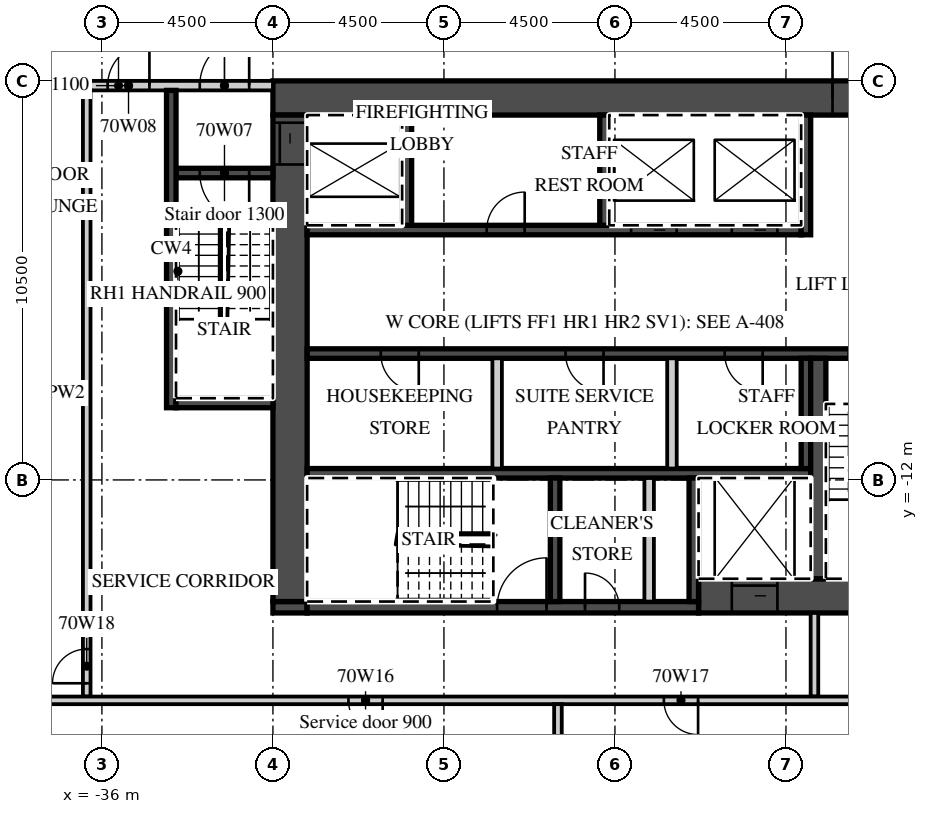
"""IFC4 building model, lengths in metres.
Left out: names, types, materials, properties, quantities, classifications, styles, units other than length and angle.
Written with IfcOpenShell. Run it as: python <this file> out.ifc"""

import sys

from ifc_helpers import new_model, si_unit, direction, frame, frame_2d, origin, place, context, subcontext, project, spatial, rectangle, extrude, element, fill, save


model = new_model("IFC4")
c1 = context("Model", 3, precision=1e-05, world=origin(), true_north=direction((0.0, 1.0)))
c2 = subcontext(c1, "Body", "Model", "MODEL_VIEW")
j1 = project(units=[si_unit("LENGTHUNIT", "METRE"), si_unit("PLANEANGLEUNIT", "RADIAN")], contexts=[c1])
p1 = place(None, origin())
s1 = spatial("IfcSite", under=j1, at=p1, CompositionType="ELEMENT")
p2 = place(p1, origin())
s2 = spatial("IfcBuilding", under=s1, at=p2, CompositionType="ELEMENT")
p3 = place(p2, frame((0.0, 0.0, 281.7)))
s3 = spatial("IfcBuildingStorey", under=s2, at=p3, CompositionType="ELEMENT", Elevation=281.7)
p4 = place(p3, frame((-31.5, -1.95, 0.0), z_axis=(0.0, 0.0, 1.0), x_axis=(1.0, 0.0, 0.0)))
e1 = element("IfcWall", 1, at=p4, inside=s3, PredefinedType="SHEAR", context=c2, shape_type="SweptSolid", body=[
    extrude(rectangle(XDim=18.0, YDim=0.9, at=frame_2d((9.0, 0.0))), origin(), (0.0, 0.0, 1.0), 3.02),
])
p5 = place(p4, frame((14.725, 0.0, 0.0)))
e2 = element("IfcOpeningElement", 2, at=p5, cuts=e1, PredefinedType="OPENING", context=c2, shape_type="SweptSolid", body=[
    extrude(rectangle(XDim=1.8, YDim=2.1, at=frame_2d((0.9, 1.05))), frame((0.0, 0.46, 0.0), z_axis=(0.0, -1.0, 0.0), x_axis=(1.0, 0.0, 0.0)), (0.0, 0.0, 1.0), 0.92),
])
p6 = place(p3, frame((-20.3, -15.05, 0.0), z_axis=(0.0, 0.0, 1.0), x_axis=(1.0, 0.0, 0.0)))
e3 = element("IfcWall", 3, at=p6, inside=s3, PredefinedType="SHEAR", context=c2, shape_type="SweptSolid", body=[
    extrude(rectangle(XDim=6.8, YDim=0.9, at=frame_2d((3.4, 0.0))), origin(), (0.0, 0.0, 1.0), 3.02),
])
p7 = place(p6, frame((0.875, 0.0, 0.0)))
e4 = element("IfcOpeningElement", 4, at=p7, cuts=e3, PredefinedType="OPENING", context=c2, shape_type="SweptSolid", body=[
    extrude(rectangle(XDim=1.2, YDim=2.1, at=frame_2d((0.6, 1.05))), frame((0.0, 0.46, 0.0), z_axis=(0.0, -1.0, 0.0), x_axis=(1.0, 0.0, 0.0)), (0.0, 0.0, 1.0), 0.92),
])
p8 = place(p3, frame((-31.5, -15.35, 0.0), z_axis=(0.0, 0.0, 1.0), x_axis=(1.0, 0.0, 0.0)))
e5 = element("IfcWall", 5, at=p8, inside=s3, PredefinedType="SHEAR", context=c2, shape_type="SweptSolid", body=[
    extrude(rectangle(XDim=0.9, YDim=0.3, at=frame_2d((0.45, 0.0))), origin(), (0.0, 0.0, 1.0), 3.02),
])
p9 = place(p3, frame((-30.6, -15.35, 0.0), z_axis=(0.0, 0.0, 1.0), x_axis=(1.0, 0.0, 0.0)))
e6 = element("IfcWall", 6, at=p9, inside=s3, PredefinedType="SHEAR", context=c2, shape_type="SweptSolid", body=[
    extrude(rectangle(XDim=10.3, YDim=0.3, at=frame_2d((5.15, 0.0))), origin(), (0.0, 0.0, 1.0), 3.02),
])
p10 = place(p9, frame((5.0, 0.0, 0.0)))
e7 = element("IfcOpeningElement", 7, at=p10, cuts=e6, PredefinedType="OPENING", context=c2, shape_type="SweptSolid", body=[
    extrude(rectangle(XDim=1.3, YDim=2.1, at=frame_2d((0.65, 1.05))), frame((0.0, 0.16, 0.0), z_axis=(0.0, -1.0, 0.0), x_axis=(1.0, 0.0, 0.0)), (0.0, 0.0, 1.0), 0.32),
])
p11 = place(p9, frame((7.312, 0.0, 0.0)))
e8 = element("IfcOpeningElement", 8, at=p11, cuts=e6, PredefinedType="OPENING", context=c2, shape_type="SweptSolid", body=[
    extrude(rectangle(XDim=0.9, YDim=2.1, at=frame_2d((0.45, 1.05))), frame((0.0, 0.16, 0.0), z_axis=(0.0, -1.0, 0.0), x_axis=(1.0, 0.0, 0.0)), (0.0, 0.0, 1.0), 0.32),
])
p12 = place(p3, frame((-31.05, -15.2, 0.0), z_axis=(0.0, 0.0, 1.0), x_axis=(0.0, 1.0, 0.0)))
e9 = element("IfcWall", 9, at=p12, inside=s3, PredefinedType="SHEAR", context=c2, shape_type="SweptSolid", body=[
    extrude(rectangle(XDim=12.8, YDim=0.9, at=frame_2d((6.4, 0.0))), origin(), (0.0, 0.0, 1.0), 3.02),
])
p13 = place(p12, frame((11.5, 0.0, 0.0)))
e10 = element("IfcOpeningElement", 10, at=p13, cuts=e9, PredefinedType="OPENING", context=c2, shape_type="SweptSolid", body=[
    extrude(rectangle(XDim=1.1, YDim=2.1, at=frame_2d((0.55, 1.05))), frame((0.0, 0.46, 0.0), z_axis=(0.0, -1.0, 0.0), x_axis=(1.0, 0.0, 0.0)), (0.0, 0.0, 1.0), 0.92),
])
p14 = place(p3, frame((-30.6, -5.425, 0.0), z_axis=(0.0, 0.0, 1.0), x_axis=(1.0, 0.0, 0.0)))
e11 = element("IfcWall", 11, at=p14, inside=s3, PredefinedType="SHEAR", context=c2, shape_type="SweptSolid", body=[
    extrude(rectangle(XDim=13.0, YDim=0.25, at=frame_2d((6.5, 0.0))), origin(), (0.0, 0.0, 1.0), 3.02),
])
p15 = place(p14, frame((8.525, 0.0, 0.0)))
e12 = element("IfcOpeningElement", 12, at=p15, cuts=e11, PredefinedType="OPENING", context=c2, shape_type="SweptSolid", body=[
    extrude(rectangle(XDim=1.2, YDim=2.1, at=frame_2d((0.6, 1.05))), frame((0.0, 0.135, 0.0), z_axis=(0.0, -1.0, 0.0), x_axis=(1.0, 0.0, 0.0)), (0.0, 0.0, 1.0), 0.27),
])
p16 = place(p14, frame((11.175, 0.0, 0.0)))
e13 = element("IfcOpeningElement", 13, at=p16, cuts=e11, PredefinedType="OPENING", context=c2, shape_type="SweptSolid", body=[
    extrude(rectangle(XDim=1.2, YDim=2.1, at=frame_2d((0.6, 1.05))), frame((0.0, 0.135, 0.0), z_axis=(0.0, -1.0, 0.0), x_axis=(1.0, 0.0, 0.0)), (0.0, 0.0, 1.0), 0.27),
])
p17 = place(p14, frame((4.725, 0.0, 0.0)))
e14 = element("IfcOpeningElement", 14, at=p17, cuts=e11, PredefinedType="OPENING", context=c2, shape_type="SweptSolid", body=[
    extrude(rectangle(XDim=1.0, YDim=2.1, at=frame_2d((0.5, 1.05))), frame((0.0, 0.135, 0.0), z_axis=(0.0, -1.0, 0.0), x_axis=(1.0, 0.0, 0.0)), (0.0, 0.0, 1.0), 0.27),
])
p18 = place(p3, frame((-17.475, -5.55, 0.0), z_axis=(0.0, 0.0, 1.0), x_axis=(0.0, 1.0, 0.0)))
e15 = element("IfcWall", 15, at=p18, inside=s3, PredefinedType="SHEAR", context=c2, shape_type="SweptSolid", body=[
    extrude(rectangle(XDim=3.15, YDim=0.25, at=frame_2d((1.575, 0.0))), origin(), (0.0, 0.0, 1.0), 3.02),
])
for number, where, z_axis, x_axis in (
    (16, (-27.975, -5.3, 0.0), (0.0, 0.0, 1.0), (0.0, 1.0, 0.0)),
    (17, (-22.775, -5.3, 0.0), (0.0, 0.0, 1.0), (0.0, 1.0, 0.0)),
):
    element("IfcWall", number, at=place(p3, frame(where, z_axis=z_axis, x_axis=x_axis)), inside=s3, PredefinedType="SHEAR", context=c2, shape_type="SweptSolid", body=[
        extrude(rectangle(XDim=2.9, YDim=0.25, at=frame_2d((1.45, 0.0))), origin(), (0.0, 0.0, 1.0), 3.02),
    ])
p19 = place(p3, frame((-30.6, -8.675, 0.0), z_axis=(0.0, 0.0, 1.0), x_axis=(1.0, 0.0, 0.0)))
e18 = element("IfcWall", 18, at=p19, inside=s3, PredefinedType="SHEAR", context=c2, shape_type="SweptSolid", body=[
    extrude(rectangle(XDim=16.2, YDim=0.25, at=frame_2d((8.1, 0.0))), origin(), (0.0, 0.0, 1.0), 3.02),
])
p20 = place(p19, frame((14.25, 0.0, 0.0)))
e19 = element("IfcOpeningElement", 19, at=p20, cuts=e18, PredefinedType="OPENING", context=c2, shape_type="SweptSolid", body=[
    extrude(rectangle(XDim=1.3, YDim=2.1, at=frame_2d((0.65, 1.05))), frame((0.0, 0.135, 0.0), z_axis=(0.0, -1.0, 0.0), x_axis=(1.0, 0.0, 0.0)), (0.0, 0.0, 1.0), 0.27),
])
p21 = place(p19, frame((1.938, 0.0, 0.0)))
e20 = element("IfcOpeningElement", 20, at=p21, cuts=e18, PredefinedType="OPENING", context=c2, shape_type="SweptSolid", body=[
    extrude(rectangle(XDim=1.0, YDim=2.1, at=frame_2d((0.5, 1.05))), frame((0.0, 0.135, 0.0), z_axis=(0.0, -1.0, 0.0), x_axis=(1.0, 0.0, 0.0)), (0.0, 0.0, 1.0), 0.27),
])
p22 = place(p19, frame((6.8, 0.0, 0.0)))
e21 = element("IfcOpeningElement", 21, at=p22, cuts=e18, PredefinedType="OPENING", context=c2, shape_type="SweptSolid", body=[
    extrude(rectangle(XDim=1.0, YDim=2.1, at=frame_2d((0.5, 1.05))), frame((0.0, 0.135, 0.0), z_axis=(0.0, -1.0, 0.0), x_axis=(1.0, 0.0, 0.0)), (0.0, 0.0, 1.0), 0.27),
])
p23 = place(p19, frame((10.988, 0.0, 0.0)))
e22 = element("IfcOpeningElement", 22, at=p23, cuts=e18, PredefinedType="OPENING", context=c2, shape_type="SweptSolid", body=[
    extrude(rectangle(XDim=1.0, YDim=2.1, at=frame_2d((0.5, 1.05))), frame((0.0, 0.135, 0.0), z_axis=(0.0, -1.0, 0.0), x_axis=(1.0, 0.0, 0.0)), (0.0, 0.0, 1.0), 0.27),
])
p24 = place(p3, frame((-30.6, -11.825, 0.0), z_axis=(0.0, 0.0, 1.0), x_axis=(1.0, 0.0, 0.0)))
e23 = element("IfcWall", 23, at=p24, inside=s3, PredefinedType="SHEAR", context=c2, shape_type="SweptSolid", body=[
    extrude(rectangle(XDim=13.25, YDim=0.25, at=frame_2d((6.625, 0.0))), origin(), (0.0, 0.0, 1.0), 3.02),
])
p25 = place(p3, frame((-17.475, -11.7, 0.0), z_axis=(0.0, 0.0, 1.0), x_axis=(0.0, 1.0, 0.0)))
e24 = element("IfcWall", 24, at=p25, inside=s3, PredefinedType="SHEAR", context=c2, shape_type="SweptSolid", body=[
    extrude(rectangle(XDim=2.9, YDim=0.25, at=frame_2d((1.45, 0.0))), origin(), (0.0, 0.0, 1.0), 3.02),
])
for number, where, z_axis, x_axis in (
    (25, (-25.6, -11.7, 0.0), (0.0, 0.0, 1.0), (0.0, 1.0, 0.0)),
    (26, (-21.0, -11.7, 0.0), (0.0, 0.0, 1.0), (0.0, 1.0, 0.0)),
):
    element("IfcWall", number, at=place(p3, frame(where, z_axis=z_axis, x_axis=x_axis)), inside=s3, PredefinedType="PARTITIONING", context=c2, shape_type="SweptSolid", body=[
        extrude(rectangle(XDim=2.9, YDim=0.25, at=frame_2d((1.45, 0.0))), origin(), (0.0, 0.0, 1.0), 3.02),
    ])
p26 = place(p3, frame((-17.15, -14.6, 0.0), z_axis=(0.0, 0.0, 1.0), x_axis=(0.0, 1.0, 0.0)))
e27 = element("IfcWall", 27, at=p26, inside=s3, PredefinedType="SHEAR", context=c2, shape_type="SweptSolid", body=[
    extrude(rectangle(XDim=5.8, YDim=0.4, at=frame_2d((2.9, 0.0))), origin(), (0.0, 0.0, 1.0), 3.02),
])
for number, where, z_axis, x_axis in (
    (28, (-20.425, -15.2, 0.0), (0.0, 0.0, 1.0), (0.0, 1.0, 0.0)),
    (29, (-24.075, -15.2, 0.0), (0.0, 0.0, 1.0), (0.0, 1.0, 0.0)),
):
    element("IfcWall", number, at=place(p3, frame(where, z_axis=z_axis, x_axis=x_axis)), inside=s3, PredefinedType="SHEAR", context=c2, shape_type="SweptSolid", body=[
        extrude(rectangle(XDim=3.25, YDim=0.25, at=frame_2d((1.625, 0.0))), origin(), (0.0, 0.0, 1.0), 3.02),
    ])
p27 = place(p3, frame((-21.6, -15.2, 0.0), z_axis=(0.0, 0.0, 1.0), x_axis=(0.0, 1.0, 0.0)))
e30 = element("IfcWall", 30, at=p27, inside=s3, PredefinedType="PARTITIONING", context=c2, shape_type="SweptSolid", body=[
    extrude(rectangle(XDim=3.25, YDim=0.25, at=frame_2d((1.625, 0.0))), origin(), (0.0, 0.0, 1.0), 3.02),
])
p28 = place(p3, frame((-39.627, -1.625, 0.0), z_axis=(0.0, 0.0, 1.0), x_axis=(1.0, 0.0, 0.0)))
e31 = element("IfcWall", 31, at=p28, inside=s3, PredefinedType="PARTITIONING", context=c2, shape_type="SweptSolid", body=[
    extrude(rectangle(XDim=8.127, YDim=0.25, at=frame_2d((4.063, 0.0))), origin(), (0.0, 0.0, 1.0), 3.02),
])
p29 = place(p28, frame((6.202, 0.0, 0.0)))
e32 = element("IfcOpeningElement", 32, at=p29, cuts=e31, PredefinedType="OPENING", context=c2, shape_type="SweptSolid", body=[
    extrude(rectangle(XDim=1.3, YDim=2.1, at=frame_2d((0.65, 1.05))), frame((0.0, 0.135, 0.0), z_axis=(0.0, -1.0, 0.0), x_axis=(1.0, 0.0, 0.0)), (0.0, 0.0, 1.0), 0.27),
])
p30 = place(p28, frame((3.777, 0.0, 0.0)))
e33 = element("IfcOpeningElement", 33, at=p30, cuts=e31, PredefinedType="OPENING", context=c2, shape_type="SweptSolid", body=[
    extrude(rectangle(XDim=1.1, YDim=2.1, at=frame_2d((0.55, 1.05))), frame((0.0, 0.135, 0.0), z_axis=(0.0, -1.0, 0.0), x_axis=(1.0, 0.0, 0.0)), (0.0, 0.0, 1.0), 0.27),
])
p31 = place(p3, frame((-34.05, -3.925, 0.0), z_axis=(0.0, 0.0, 1.0), x_axis=(1.0, 0.0, 0.0)))
e34 = element("IfcWall", 34, at=p31, inside=s3, PredefinedType="SHEAR", context=c2, shape_type="SweptSolid", body=[
    extrude(rectangle(XDim=2.55, YDim=0.25, at=frame_2d((1.275, 0.0))), origin(), (0.0, 0.0, 1.0), 3.02),
])
p32 = place(p31, frame((0.625, 0.0, 0.0)))
e35 = element("IfcOpeningElement", 35, at=p32, cuts=e34, PredefinedType="OPENING", context=c2, shape_type="SweptSolid", body=[
    extrude(rectangle(XDim=1.3, YDim=2.1, at=frame_2d((0.65, 1.05))), frame((0.0, 0.135, 0.0), z_axis=(0.0, -1.0, 0.0), x_axis=(1.0, 0.0, 0.0)), (0.0, 0.0, 1.0), 0.27),
])
p33 = place(p3, frame((-34.175, -10.1, 0.0), z_axis=(0.0, 0.0, 1.0), x_axis=(0.0, 1.0, 0.0)))
e36 = element("IfcWall", 36, at=p33, inside=s3, PredefinedType="SHEAR", context=c2, shape_type="SweptSolid", body=[
    extrude(rectangle(XDim=8.35, YDim=0.25, at=frame_2d((4.175, 0.0))), origin(), (0.0, 0.0, 1.0), 3.02),
])
p34 = place(p3, frame((-34.05, -9.975, 0.0), z_axis=(0.0, 0.0, 1.0), x_axis=(1.0, 0.0, 0.0)))
e37 = element("IfcWall", 37, at=p34, inside=s3, PredefinedType="SHEAR", context=c2, shape_type="SweptSolid", body=[
    extrude(rectangle(XDim=2.55, YDim=0.25, at=frame_2d((1.275, 0.0))), origin(), (0.0, 0.0, 1.0), 3.02),
])
p35 = place(p3, frame((-17.25, -17.7, 0.0), z_axis=(0.0, 0.0, 1.0), x_axis=(0.0, 1.0, 0.0)))
e38 = element("IfcWall", 38, at=p35, inside=s3, PredefinedType="PARTITIONING", context=c2, shape_type="SweptSolid", body=[
    extrude(rectangle(XDim=2.2, YDim=0.2, at=frame_2d((1.1, 0.0))), origin(), (0.0, 0.0, 1.0), 3.02),
])
p36 = place(p3, frame((-36.4, -17.7, 0.0), z_axis=(0.0, 0.0, 1.0), x_axis=(0.0, 1.0, 0.0)))
e39 = element("IfcWall", 39, at=p36, inside=s3, PredefinedType="PARTITIONING", context=c2, shape_type="SweptSolid", body=[
    extrude(rectangle(XDim=15.95, YDim=0.2, at=frame_2d((7.975, 0.0))), origin(), (0.0, 0.0, 1.0), 3.02),
])
p37 = place(p36, frame((0.35, 0.0, 0.0)))
e40 = element("IfcOpeningElement", 40, at=p37, cuts=e39, PredefinedType="OPENING", context=c2, shape_type="SweptSolid", body=[
    extrude(rectangle(XDim=0.9, YDim=2.1, at=frame_2d((0.45, 1.05))), frame((0.0, 0.11, 0.0), z_axis=(0.0, -1.0, 0.0), x_axis=(1.0, 0.0, 0.0)), (0.0, 0.0, 1.0), 0.22),
])
p38 = place(p3, frame((-38.07, -17.8, 0.0), z_axis=(0.0, 0.0, 1.0), x_axis=(1.0, 0.0, 0.0)))
e41 = element("IfcWall", 41, at=p38, inside=s3, PredefinedType="PARTITIONING", context=c2, shape_type="SweptSolid", body=[
    extrude(rectangle(XDim=24.47, YDim=0.2, at=frame_2d((12.235, 0.0))), origin(), (0.0, 0.0, 1.0), 3.02),
])
p39 = place(p38, frame((8.557, 0.0, 0.0)))
e42 = element("IfcOpeningElement", 42, at=p39, cuts=e41, PredefinedType="OPENING", context=c2, shape_type="SweptSolid", body=[
    extrude(rectangle(XDim=0.9, YDim=2.1, at=frame_2d((0.45, 1.05))), frame((0.0, 0.11, 0.0), z_axis=(0.0, -1.0, 0.0), x_axis=(1.0, 0.0, 0.0)), (0.0, 0.0, 1.0), 0.22),
])
p40 = place(p38, frame((16.857, 0.0, 0.0)))
e43 = element("IfcOpeningElement", 43, at=p40, cuts=e41, PredefinedType="OPENING", context=c2, shape_type="SweptSolid", body=[
    extrude(rectangle(XDim=0.9, YDim=2.1, at=frame_2d((0.45, 1.05))), frame((0.0, 0.11, 0.0), z_axis=(0.0, -1.0, 0.0), x_axis=(1.0, 0.0, 0.0)), (0.0, 0.0, 1.0), 0.22),
])
p41 = place(p3, frame((-24.0, -22.408, 0.0), z_axis=(0.0, 0.0, 1.0), x_axis=(0.0, 1.0, 0.0)))
e44 = element("IfcWall", 44, at=p41, inside=s3, PredefinedType="PARTITIONING", context=c2, shape_type="SweptSolid", body=[
    extrude(rectangle(XDim=4.508, YDim=0.2, at=frame_2d((2.254, 0.0))), origin(), (0.0, 0.0, 1.0), 3.02),
])
p42 = place(p15, origin())
e45 = element("IfcDoor", 45, at=p42, inside=s3, OperationType="SLIDING_TO_LEFT", PredefinedType="DOOR", context=c2, shape_type="SweptSolid", body=[
    extrude(rectangle(XDim=1.2, YDim=2.1, at=frame_2d((0.6, 1.05))), frame((0.0, 0.025, 0.0), z_axis=(0.0, -1.0, 0.0), x_axis=(1.0, 0.0, 0.0)), (0.0, 0.0, 1.0), 0.05),
])
fill(e12, e45)
p43 = place(p16, origin())
e46 = element("IfcDoor", 46, at=p43, inside=s3, OperationType="SLIDING_TO_RIGHT", PredefinedType="DOOR", context=c2, shape_type="SweptSolid", body=[
    extrude(rectangle(XDim=1.2, YDim=2.1, at=frame_2d((0.6, 1.05))), frame((0.0, 0.025, 0.0), z_axis=(0.0, -1.0, 0.0), x_axis=(1.0, 0.0, 0.0)), (0.0, 0.0, 1.0), 0.05),
])
fill(e13, e46)
p44 = place(p7, origin())
e47 = element("IfcDoor", 47, at=p44, inside=s3, OperationType="SLIDING_TO_LEFT", PredefinedType="DOOR", context=c2, shape_type="SweptSolid", body=[
    extrude(rectangle(XDim=1.2, YDim=2.1, at=frame_2d((0.6, 1.05))), frame((0.0, 0.025, 0.0), z_axis=(0.0, -1.0, 0.0), x_axis=(1.0, 0.0, 0.0)), (0.0, 0.0, 1.0), 0.05),
])
fill(e4, e47)
p45 = place(p13, origin())
e48 = element("IfcDoor", 48, at=p45, inside=s3, OperationType="SLIDING_TO_RIGHT", PredefinedType="DOOR", context=c2, shape_type="SweptSolid", body=[
    extrude(rectangle(XDim=1.1, YDim=2.1, at=frame_2d((0.55, 1.05))), frame((0.0, 0.025, 0.0), z_axis=(0.0, -1.0, 0.0), x_axis=(1.0, 0.0, 0.0)), (0.0, 0.0, 1.0), 0.05),
])
fill(e10, e48)
p46 = place(p5, origin())
e49 = element("IfcDoor", 49, at=p46, inside=s3, OperationType="DOUBLE_DOOR_DOUBLE_SWING", PredefinedType="DOOR", context=c2, shape_type="SweptSolid", body=[
    extrude(rectangle(XDim=1.8, YDim=2.1, at=frame_2d((0.9, 1.05))), frame((0.0, 0.025, 0.0), z_axis=(0.0, -1.0, 0.0), x_axis=(1.0, 0.0, 0.0)), (0.0, 0.0, 1.0), 0.05),
])
fill(e2, e49)
p47 = place(p29, origin())
e50 = element("IfcDoor", 50, at=p47, inside=s3, OperationType="SINGLE_SWING_RIGHT", PredefinedType="DOOR", context=c2, shape_type="SweptSolid", body=[
    extrude(rectangle(XDim=1.3, YDim=2.1, at=frame_2d((0.65, 1.05))), frame((0.0, 0.025, 0.0), z_axis=(0.0, -1.0, 0.0), x_axis=(1.0, 0.0, 0.0)), (0.0, 0.0, 1.0), 0.05),
])
fill(e32, e50)
p48 = place(p32, origin())
e51 = element("IfcDoor", 51, at=p48, inside=s3, OperationType="SINGLE_SWING_RIGHT", PredefinedType="DOOR", context=c2, shape_type="SweptSolid", body=[
    extrude(rectangle(XDim=1.3, YDim=2.1, at=frame_2d((0.65, 1.05))), frame((0.0, 0.025, 0.0), z_axis=(0.0, -1.0, 0.0), x_axis=(1.0, 0.0, 0.0)), (0.0, 0.0, 1.0), 0.05),
])
fill(e35, e51)
p49 = place(p30, origin())
e52 = element("IfcDoor", 52, at=p49, inside=s3, OperationType="SINGLE_SWING_RIGHT", PredefinedType="DOOR", context=c2, shape_type="SweptSolid", body=[
    extrude(rectangle(XDim=1.1, YDim=2.1, at=frame_2d((0.55, 1.05))), frame((0.0, 0.025, 0.0), z_axis=(0.0, -1.0, 0.0), x_axis=(1.0, 0.0, 0.0)), (0.0, 0.0, 1.0), 0.05),
])
fill(e33, e52)
p50 = place(p20, origin())
e53 = element("IfcDoor", 53, at=p50, inside=s3, OperationType="SINGLE_SWING_RIGHT", PredefinedType="DOOR", context=c2, shape_type="SweptSolid", body=[
    extrude(rectangle(XDim=1.3, YDim=2.1, at=frame_2d((0.65, 1.05))), frame((0.0, 0.025, 0.0), z_axis=(0.0, -1.0, 0.0), x_axis=(1.0, 0.0, 0.0)), (0.0, 0.0, 1.0), 0.05),
])
fill(e19, e53)
p51 = place(p10, origin())
e54 = element("IfcDoor", 54, at=p51, inside=s3, OperationType="SINGLE_SWING_RIGHT", PredefinedType="DOOR", context=c2, shape_type="SweptSolid", body=[
    extrude(rectangle(XDim=1.3, YDim=2.1, at=frame_2d((0.65, 1.05))), frame((0.0, 0.025, 0.0), z_axis=(0.0, -1.0, 0.0), x_axis=(1.0, 0.0, 0.0)), (0.0, 0.0, 1.0), 0.05),
])
fill(e7, e54)
p52 = place(p11, origin())
e55 = element("IfcDoor", 55, at=p52, inside=s3, OperationType="SINGLE_SWING_LEFT", PredefinedType="DOOR", context=c2, shape_type="SweptSolid", body=[
    extrude(rectangle(XDim=0.9, YDim=2.1, at=frame_2d((0.45, 1.05))), frame((0.0, 0.025, 0.0), z_axis=(0.0, -1.0, 0.0), x_axis=(1.0, 0.0, 0.0)), (0.0, 0.0, 1.0), 0.05),
])
fill(e8, e55)
p53 = place(p21, origin())
e56 = element("IfcDoor", 56, at=p53, inside=s3, OperationType="SINGLE_SWING_RIGHT", PredefinedType="DOOR", context=c2, shape_type="SweptSolid", body=[
    extrude(rectangle(XDim=1.0, YDim=2.1, at=frame_2d((0.5, 1.05))), frame((0.0, 0.025, 0.0), z_axis=(0.0, -1.0, 0.0), x_axis=(1.0, 0.0, 0.0)), (0.0, 0.0, 1.0), 0.05),
])
fill(e20, e56)
p54 = place(p22, origin())
e57 = element("IfcDoor", 57, at=p54, inside=s3, OperationType="SINGLE_SWING_RIGHT", PredefinedType="DOOR", context=c2, shape_type="SweptSolid", body=[
    extrude(rectangle(XDim=1.0, YDim=2.1, at=frame_2d((0.5, 1.05))), frame((0.0, 0.025, 0.0), z_axis=(0.0, -1.0, 0.0), x_axis=(1.0, 0.0, 0.0)), (0.0, 0.0, 1.0), 0.05),
])
fill(e21, e57)
p55 = place(p23, origin())
e58 = element("IfcDoor", 58, at=p55, inside=s3, OperationType="SINGLE_SWING_RIGHT", PredefinedType="DOOR", context=c2, shape_type="SweptSolid", body=[
    extrude(rectangle(XDim=1.0, YDim=2.1, at=frame_2d((0.5, 1.05))), frame((0.0, 0.025, 0.0), z_axis=(0.0, -1.0, 0.0), x_axis=(1.0, 0.0, 0.0)), (0.0, 0.0, 1.0), 0.05),
])
fill(e22, e58)
p56 = place(p17, origin())
e59 = element("IfcDoor", 59, at=p56, inside=s3, OperationType="SINGLE_SWING_RIGHT", PredefinedType="DOOR", context=c2, shape_type="SweptSolid", body=[
    extrude(rectangle(XDim=1.0, YDim=2.1, at=frame_2d((0.5, 1.05))), frame((0.0, 0.025, 0.0), z_axis=(0.0, -1.0, 0.0), x_axis=(1.0, 0.0, 0.0)), (0.0, 0.0, 1.0), 0.05),
])
fill(e14, e59)
p57 = place(p39, origin())
e60 = element("IfcDoor", 60, at=p57, inside=s3, OperationType="SINGLE_SWING_RIGHT", PredefinedType="DOOR", context=c2, shape_type="SweptSolid", body=[
    extrude(rectangle(XDim=0.9, YDim=2.1, at=frame_2d((0.45, 1.05))), frame((0.0, 0.025, 0.0), z_axis=(0.0, -1.0, 0.0), x_axis=(1.0, 0.0, 0.0)), (0.0, 0.0, 1.0), 0.05),
])
fill(e42, e60)
p58 = place(p40, origin())
e61 = element("IfcDoor", 61, at=p58, inside=s3, OperationType="SINGLE_SWING_RIGHT", PredefinedType="DOOR", context=c2, shape_type="SweptSolid", body=[
    extrude(rectangle(XDim=0.9, YDim=2.1, at=frame_2d((0.45, 1.05))), frame((0.0, 0.025, 0.0), z_axis=(0.0, -1.0, 0.0), x_axis=(1.0, 0.0, 0.0)), (0.0, 0.0, 1.0), 0.05),
])
fill(e43, e61)
p59 = place(p37, origin())
e62 = element("IfcDoor", 62, at=p59, inside=s3, OperationType="SINGLE_SWING_LEFT", PredefinedType="DOOR", context=c2, shape_type="SweptSolid", body=[
    extrude(rectangle(XDim=0.9, YDim=2.1, at=frame_2d((0.45, 1.05))), frame((0.0, 0.025, 0.0), z_axis=(0.0, -1.0, 0.0), x_axis=(1.0, 0.0, 0.0)), (0.0, 0.0, 1.0), 0.05),
])
fill(e40, e62)
save(model, sys.argv[1])
